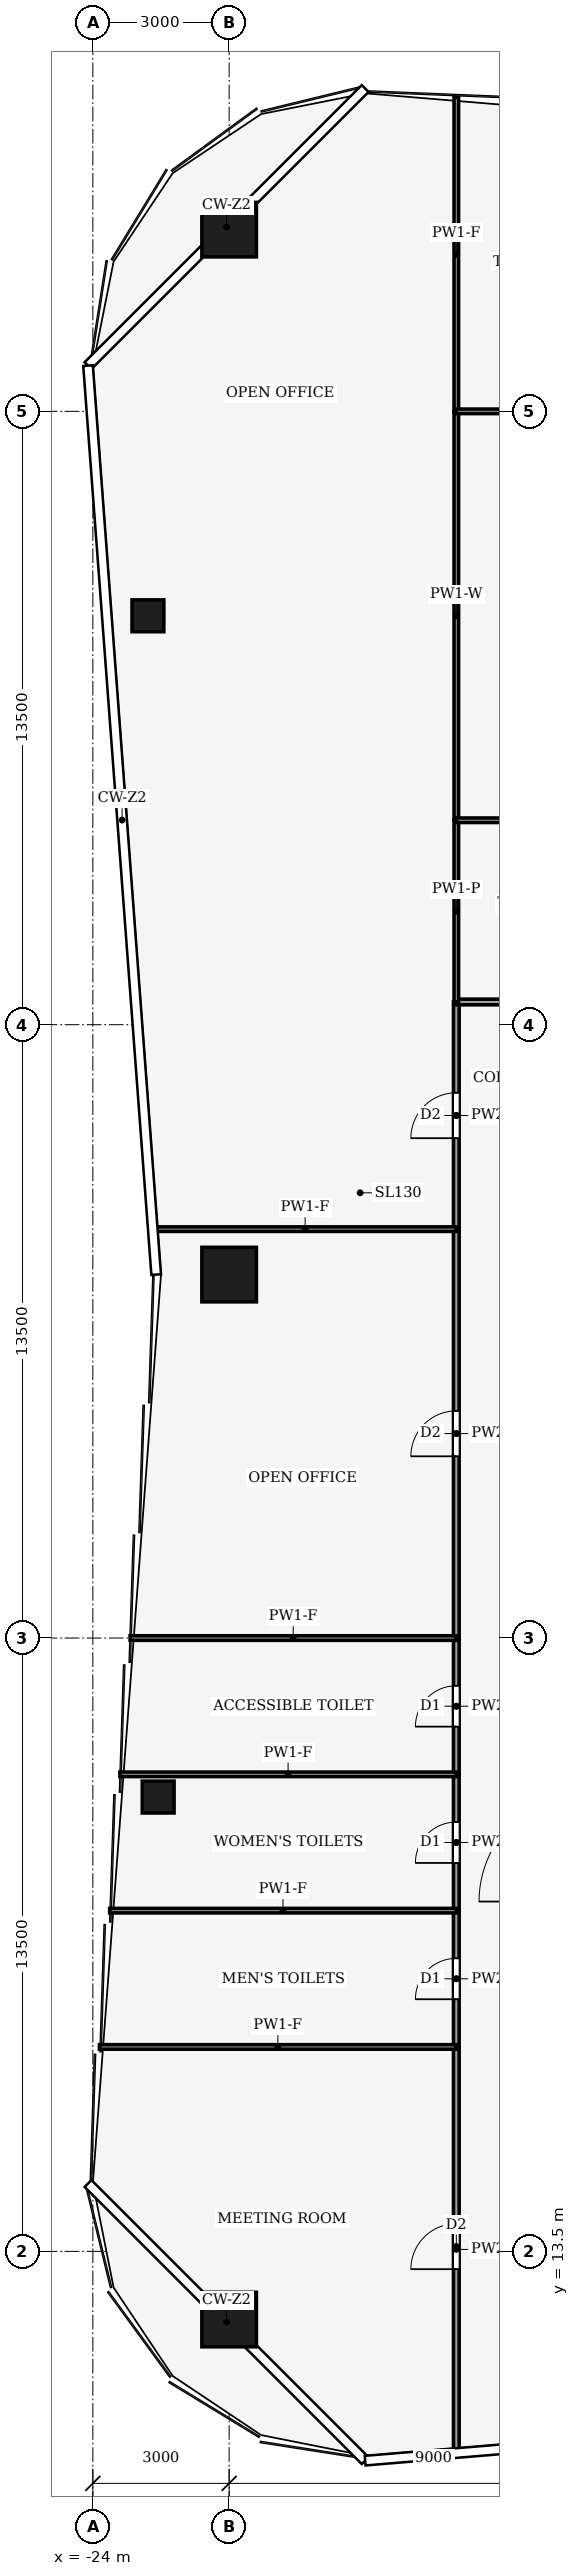
"""IFC4 building model, lengths in metres.
Left out: names, types, materials, properties, quantities, classifications, styles, units other than length and angle.
Written with IfcOpenShell. Run it as: python <this file> out.ifc"""

import sys

from ifc_helpers import new_model, si_unit, direction, frame, frame_2d, origin, origin_2d, place, context, subcontext, project, spatial, rectangle, hollow_rectangle, extrude, element, fill, save


model = new_model("IFC4")
c1 = context("Model", 3, precision=1e-05, world=origin(), true_north=direction((0.0, 1.0)))
c2 = subcontext(c1, "Body", "Model", "MODEL_VIEW")
j1 = project(units=[si_unit("LENGTHUNIT", "METRE"), si_unit("PLANEANGLEUNIT", "RADIAN")], contexts=[c1])
p1 = place(None, origin())
s1 = spatial("IfcSite", under=j1, at=p1, CompositionType="ELEMENT")
p2 = place(p1, origin())
s2 = spatial("IfcBuilding", under=s1, at=p2, CompositionType="ELEMENT")
p3 = place(p2, frame((0.0, 0.0, 130.0)))
s3 = spatial("IfcBuildingStorey", under=s2, at=p3, CompositionType="ELEMENT", Elevation=130.0)
for number, where, z_axis, x_axis in (
    (1, (-21.0, 58.0, 0.0), (0.0, 0.0, 1.0), (1.0, 0.0, 0.0)),
    (2, (-21.0, 12.0, 0.0), (0.0, 0.0, 1.0), (1.0, 0.0, 0.0)),
    (3, (-21.0, 35.0, 0.0), (0.0, 0.0, 1.0), (1.0, 0.0, 0.0)),
):
    element("IfcColumn", number, at=place(p3, frame(where, z_axis=z_axis, x_axis=x_axis)), inside=s3, PredefinedType="COLUMN", context=c2, shape_type="SweptSolid", body=[
        extrude(hollow_rectangle(XDim=1.2, YDim=1.2, WallThickness=0.07, at=origin_2d()), origin(), (0.0, 0.0, 1.0), 4.0),
    ])
for number, where, z_axis, x_axis in (
    (4, (-22.562, 23.5, 0.0), (0.0, 0.0, 1.0), (1.0, 0.0, 0.0)),
    (5, (-22.788, 49.5, 0.0), (0.0, 0.0, 1.0), (1.0, 0.0, 0.0)),
):
    element("IfcColumn", number, at=place(p3, frame(where, z_axis=z_axis, x_axis=x_axis)), inside=s3, PredefinedType="COLUMN", context=c2, shape_type="SweptSolid", body=[
        extrude(hollow_rectangle(XDim=0.7, YDim=0.7, WallThickness=0.03, at=origin_2d()), origin(), (0.0, 0.0, 1.0), 4.0),
    ])
p4 = place(p3, frame((-16.0, 9.087, 0.0), z_axis=(0.0, 0.0, 1.0), x_axis=(0.0, 1.0, 0.0)))
e6 = element("IfcWall", 6, at=p4, inside=s3, PredefinedType="PARTITIONING", context=c2, shape_type="SweptSolid", body=[
    extrude(rectangle(XDim=8.913, YDim=0.125, at=frame_2d((4.457, 0.0))), origin(), (0.0, 0.0, 1.0), 3.04),
])
p5 = place(p4, frame((4.022, 0.0, 0.0)))
e7 = element("IfcOpeningElement", 7, at=p5, cuts=e6, PredefinedType="OPENING", context=c2, shape_type="SweptSolid", body=[
    extrude(rectangle(XDim=1.0, YDim=2.1, at=frame_2d((0.5, 1.05))), frame((0.0, 0.073, 0.0), z_axis=(0.0, -1.0, 0.0), x_axis=(1.0, 0.0, 0.0)), (0.0, 0.0, 1.0), 0.145),
])
p6 = place(p3, frame((-16.0, 18.0, 0.0), z_axis=(0.0, 0.0, 1.0), x_axis=(0.0, 1.0, 0.0)))
e8 = element("IfcWall", 8, at=p6, inside=s3, PredefinedType="PARTITIONING", context=c2, shape_type="SweptSolid", body=[
    extrude(rectangle(XDim=3.0, YDim=0.125, at=frame_2d((1.5, 0.0))), origin(), (0.0, 0.0, 1.0), 3.48),
])
p7 = place(p6, frame((1.05, 0.0, 0.0)))
e9 = element("IfcOpeningElement", 9, at=p7, cuts=e8, PredefinedType="OPENING", context=c2, shape_type="SweptSolid", body=[
    extrude(rectangle(XDim=0.9, YDim=2.1, at=frame_2d((0.45, 1.05))), frame((0.0, 0.073, 0.0), z_axis=(0.0, -1.0, 0.0), x_axis=(1.0, 0.0, 0.0)), (0.0, 0.0, 1.0), 0.145),
])
p8 = place(p3, frame((-16.0, 21.0, 0.0), z_axis=(0.0, 0.0, 1.0), x_axis=(0.0, 1.0, 0.0)))
e10 = element("IfcWall", 10, at=p8, inside=s3, PredefinedType="PARTITIONING", context=c2, shape_type="SweptSolid", body=[
    extrude(rectangle(XDim=3.0, YDim=0.125, at=frame_2d((1.5, 0.0))), origin(), (0.0, 0.0, 1.0), 3.48),
])
p9 = place(p8, frame((1.05, 0.0, 0.0)))
e11 = element("IfcOpeningElement", 11, at=p9, cuts=e10, PredefinedType="OPENING", context=c2, shape_type="SweptSolid", body=[
    extrude(rectangle(XDim=0.9, YDim=2.1, at=frame_2d((0.45, 1.05))), frame((0.0, 0.073, 0.0), z_axis=(0.0, -1.0, 0.0), x_axis=(1.0, 0.0, 0.0)), (0.0, 0.0, 1.0), 0.145),
])
p10 = place(p3, frame((-16.0, 24.0, 0.0), z_axis=(0.0, 0.0, 1.0), x_axis=(0.0, 1.0, 0.0)))
e12 = element("IfcWall", 12, at=p10, inside=s3, PredefinedType="PARTITIONING", context=c2, shape_type="SweptSolid", body=[
    extrude(rectangle(XDim=3.0, YDim=0.125, at=frame_2d((1.5, 0.0))), origin(), (0.0, 0.0, 1.0), 3.87),
])
p11 = place(p10, frame((1.05, 0.0, 0.0)))
e13 = element("IfcOpeningElement", 13, at=p11, cuts=e12, PredefinedType="OPENING", context=c2, shape_type="SweptSolid", body=[
    extrude(rectangle(XDim=0.9, YDim=2.1, at=frame_2d((0.45, 1.05))), frame((0.0, 0.073, 0.0), z_axis=(0.0, -1.0, 0.0), x_axis=(1.0, 0.0, 0.0)), (0.0, 0.0, 1.0), 0.145),
])
p12 = place(p3, frame((-16.0, 27.0, 0.0), z_axis=(0.0, 0.0, 1.0), x_axis=(0.0, 1.0, 0.0)))
e14 = element("IfcWall", 14, at=p12, inside=s3, PredefinedType="PARTITIONING", context=c2, shape_type="SweptSolid", body=[
    extrude(rectangle(XDim=9.0, YDim=0.125, at=frame_2d((4.5, 0.0))), origin(), (0.0, 0.0, 1.0), 3.48),
])
p13 = place(p12, frame((4.0, 0.0, 0.0)))
e15 = element("IfcOpeningElement", 15, at=p13, cuts=e14, PredefinedType="OPENING", context=c2, shape_type="SweptSolid", body=[
    extrude(rectangle(XDim=1.0, YDim=2.1, at=frame_2d((0.5, 1.05))), frame((0.0, 0.073, 0.0), z_axis=(0.0, -1.0, 0.0), x_axis=(1.0, 0.0, 0.0)), (0.0, 0.0, 1.0), 0.145),
])
p14 = place(p3, frame((-16.0, 36.0, 0.0), z_axis=(0.0, 0.0, 1.0), x_axis=(0.0, 1.0, 0.0)))
e16 = element("IfcWall", 16, at=p14, inside=s3, PredefinedType="PARTITIONING", context=c2, shape_type="SweptSolid", body=[
    extrude(rectangle(XDim=5.004, YDim=0.125, at=frame_2d((2.502, 0.0))), origin(), (0.0, 0.0, 1.0), 3.14),
])
p15 = place(p14, frame((2.002, 0.0, 0.0)))
e17 = element("IfcOpeningElement", 17, at=p15, cuts=e16, PredefinedType="OPENING", context=c2, shape_type="SweptSolid", body=[
    extrude(rectangle(XDim=1.0, YDim=2.1, at=frame_2d((0.5, 1.05))), frame((0.0, 0.073, 0.0), z_axis=(0.0, -1.0, 0.0), x_axis=(1.0, 0.0, 0.0)), (0.0, 0.0, 1.0), 0.145),
])
p16 = place(p3, frame((-16.0, 41.0, 0.0), z_axis=(0.0, 0.0, 1.0), x_axis=(1.0, 0.0, 0.0)))
e18 = element("IfcWall", 18, at=p16, inside=s3, PredefinedType="PARTITIONING", context=c2, shape_type="SweptSolid", body=[
    extrude(rectangle(XDim=4.0, YDim=0.125, at=frame_2d((2.0, 0.0))), origin(), (0.0, 0.0, 1.0), 3.44),
])
p17 = place(p16, frame((1.5, 0.0, 0.0)))
e19 = element("IfcOpeningElement", 19, at=p17, cuts=e18, PredefinedType="OPENING", context=c2, shape_type="SweptSolid", body=[
    extrude(rectangle(XDim=1.0, YDim=2.1, at=frame_2d((0.5, 1.05))), frame((0.0, 0.073, 0.0), z_axis=(0.0, -1.0, 0.0), x_axis=(1.0, 0.0, 0.0)), (0.0, 0.0, 1.0), 0.145),
])
p18 = place(p3, frame((-16.0, 18.0, 0.0), z_axis=(0.0, 0.0, 1.0), x_axis=(-1.0, 0.0, 0.0)))
e20 = element("IfcWall", 20, at=p18, inside=s3, PredefinedType="PARTITIONING", context=c2, shape_type="SweptSolid", body=[
    extrude(rectangle(XDim=7.855, YDim=0.1, at=frame_2d((3.927, 0.0))), origin(), (0.0, 0.0, 1.0), 3.04),
])
p19 = place(p3, frame((-16.0, 21.0, 0.0), z_axis=(0.0, 0.0, 1.0), x_axis=(-1.0, 0.0, 0.0)))
e21 = element("IfcWall", 21, at=p19, inside=s3, PredefinedType="PARTITIONING", context=c2, shape_type="SweptSolid", body=[
    extrude(rectangle(XDim=7.63, YDim=0.1, at=frame_2d((3.815, 0.0))), origin(), (0.0, 0.0, 1.0), 3.04),
])
p20 = place(p3, frame((-16.0, 24.0, 0.0), z_axis=(0.0, 0.0, 1.0), x_axis=(-1.0, 0.0, 0.0)))
e22 = element("IfcWall", 22, at=p20, inside=s3, PredefinedType="PARTITIONING", context=c2, shape_type="SweptSolid", body=[
    extrude(rectangle(XDim=7.405, YDim=0.1, at=frame_2d((3.703, 0.0))), origin(), (0.0, 0.0, 1.0), 3.04),
])
p21 = place(p3, frame((-16.0, 27.0, 0.0), z_axis=(0.0, 0.0, 1.0), x_axis=(-1.0, 0.0, 0.0)))
e23 = element("IfcWall", 23, at=p21, inside=s3, PredefinedType="PARTITIONING", context=c2, shape_type="SweptSolid", body=[
    extrude(rectangle(XDim=7.18, YDim=0.1, at=frame_2d((3.59, 0.0))), origin(), (0.0, 0.0, 1.0), 3.04),
])
p22 = place(p3, frame((-16.0, 36.0, 0.0), z_axis=(0.0, 0.0, 1.0), x_axis=(-1.0, 0.0, 0.0)))
e24 = element("IfcWall", 24, at=p22, inside=s3, PredefinedType="PARTITIONING", context=c2, shape_type="SweptSolid", body=[
    extrude(rectangle(XDim=6.655, YDim=0.1, at=frame_2d((3.328, 0.0))), origin(), (0.0, 0.0, 1.0), 3.04),
])
p23 = place(p3, frame((-16.0, 41.0, 0.0), z_axis=(0.0, 0.0, 1.0), x_axis=(0.0, 1.0, 0.0)))
e25 = element("IfcWall", 25, at=p23, inside=s3, PredefinedType="PARTITIONING", context=c2, shape_type="SweptSolid", body=[
    extrude(rectangle(XDim=4.0, YDim=0.1, at=frame_2d((2.0, 0.0))), origin(), (0.0, 0.0, 1.0), 3.44),
])
p24 = place(p3, frame((-16.0, 45.0, 0.0), z_axis=(0.0, 0.0, 1.0), x_axis=(0.0, 1.0, 0.0)))
e26 = element("IfcWall", 26, at=p24, inside=s3, PredefinedType="PARTITIONING", context=c2, shape_type="SweptSolid", body=[
    extrude(rectangle(XDim=9.0, YDim=0.1, at=frame_2d((4.5, 0.0))), origin(), (0.0, 0.0, 1.0), 3.24),
])
p25 = place(p3, frame((-16.0, 54.0, 0.0), z_axis=(0.0, 0.0, 1.0), x_axis=(0.0, 1.0, 0.0)))
e27 = element("IfcWall", 27, at=p25, inside=s3, PredefinedType="PARTITIONING", context=c2, shape_type="SweptSolid", body=[
    extrude(rectangle(XDim=6.913, YDim=0.1, at=frame_2d((3.457, 0.0))), origin(), (0.0, 0.0, 1.0), 3.04),
])
p26 = place(p3, frame((-11.996, 45.0, 0.0), z_axis=(0.0, 0.0, 1.0), x_axis=(-1.0, 0.0, 0.0)))
e28 = element("IfcWall", 28, at=p26, inside=s3, PredefinedType="PARTITIONING", context=c2, shape_type="SweptSolid", body=[
    extrude(rectangle(XDim=4.004, YDim=0.1, at=frame_2d((2.002, 0.0))), origin(), (0.0, 0.0, 1.0), 3.87),
])
p27 = place(p3, frame((-16.0, 54.0, 0.0), z_axis=(0.0, 0.0, 1.0), x_axis=(1.0, 0.0, 0.0)))
e29 = element("IfcWall", 29, at=p27, inside=s3, PredefinedType="PARTITIONING", context=c2, shape_type="SweptSolid", body=[
    extrude(rectangle(XDim=13.0, YDim=0.1, at=frame_2d((6.5, 0.0))), origin(), (0.0, 0.0, 1.0), 3.44),
])
p28 = place(p27, frame((6.0, 0.0, 0.0)))
e30 = element("IfcOpeningElement", 30, at=p28, cuts=e29, PredefinedType="OPENING", context=c2, shape_type="SweptSolid", body=[
    extrude(rectangle(XDim=1.0, YDim=2.1, at=frame_2d((0.5, 1.05))), frame((0.0, 0.06, 0.0), z_axis=(0.0, -1.0, 0.0), x_axis=(1.0, 0.0, 0.0)), (0.0, 0.0, 1.0), 0.12),
])
p29 = place(p5, origin())
e31 = element("IfcDoor", 31, at=p29, inside=s3, OperationType="SINGLE_SWING_RIGHT", PredefinedType="DOOR", context=c2, shape_type="SweptSolid", body=[
    extrude(rectangle(XDim=1.0, YDim=2.1, at=frame_2d((0.5, 1.05))), frame((0.0, 0.025, 0.0), z_axis=(0.0, -1.0, 0.0), x_axis=(1.0, 0.0, 0.0)), (0.0, 0.0, 1.0), 0.05),
])
fill(e7, e31)
p30 = place(p7, origin())
e32 = element("IfcDoor", 32, at=p30, inside=s3, OperationType="SINGLE_SWING_RIGHT", PredefinedType="DOOR", context=c2, shape_type="SweptSolid", body=[
    extrude(rectangle(XDim=0.9, YDim=2.1, at=frame_2d((0.45, 1.05))), frame((0.0, 0.025, 0.0), z_axis=(0.0, -1.0, 0.0), x_axis=(1.0, 0.0, 0.0)), (0.0, 0.0, 1.0), 0.05),
])
fill(e9, e32)
p31 = place(p9, origin())
e33 = element("IfcDoor", 33, at=p31, inside=s3, OperationType="SINGLE_SWING_LEFT", PredefinedType="DOOR", context=c2, shape_type="SweptSolid", body=[
    extrude(rectangle(XDim=0.9, YDim=2.1, at=frame_2d((0.45, 1.05))), frame((0.0, 0.025, 0.0), z_axis=(0.0, -1.0, 0.0), x_axis=(1.0, 0.0, 0.0)), (0.0, 0.0, 1.0), 0.05),
])
fill(e11, e33)
p32 = place(p11, origin())
e34 = element("IfcDoor", 34, at=p32, inside=s3, OperationType="SINGLE_SWING_RIGHT", PredefinedType="DOOR", context=c2, shape_type="SweptSolid", body=[
    extrude(rectangle(XDim=0.9, YDim=2.1, at=frame_2d((0.45, 1.05))), frame((0.0, 0.025, 0.0), z_axis=(0.0, -1.0, 0.0), x_axis=(1.0, 0.0, 0.0)), (0.0, 0.0, 1.0), 0.05),
])
fill(e13, e34)
p33 = place(p13, origin())
e35 = element("IfcDoor", 35, at=p33, inside=s3, OperationType="SINGLE_SWING_LEFT", PredefinedType="DOOR", context=c2, shape_type="SweptSolid", body=[
    extrude(rectangle(XDim=1.0, YDim=2.1, at=frame_2d((0.5, 1.05))), frame((0.0, 0.025, 0.0), z_axis=(0.0, -1.0, 0.0), x_axis=(1.0, 0.0, 0.0)), (0.0, 0.0, 1.0), 0.05),
])
fill(e15, e35)
p34 = place(p15, origin())
e36 = element("IfcDoor", 36, at=p34, inside=s3, OperationType="SINGLE_SWING_RIGHT", PredefinedType="DOOR", context=c2, shape_type="SweptSolid", body=[
    extrude(rectangle(XDim=1.0, YDim=2.1, at=frame_2d((0.5, 1.05))), frame((0.0, 0.025, 0.0), z_axis=(0.0, -1.0, 0.0), x_axis=(1.0, 0.0, 0.0)), (0.0, 0.0, 1.0), 0.05),
])
fill(e17, e36)
save(model, sys.argv[1])
